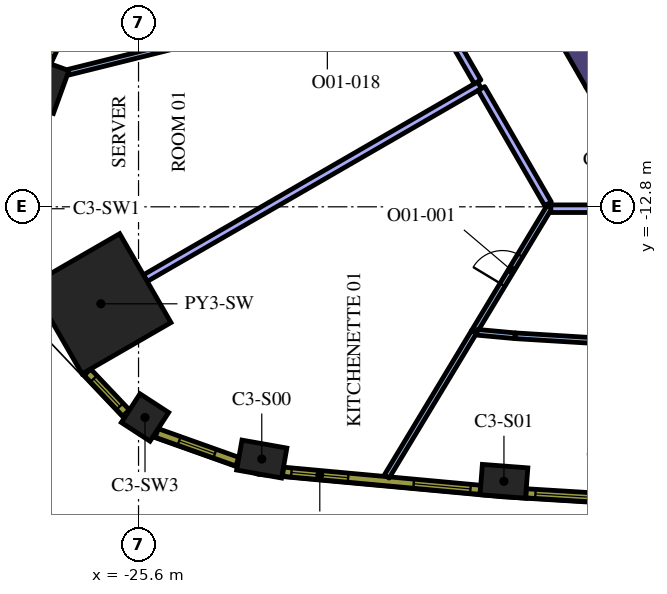
"""IFC4 building model, lengths in metres.
Left out: names, types, materials, properties, quantities, classifications, styles, units other than length and angle.
Written with IfcOpenShell. Run it as: python <this file> out.ifc"""

import sys

from ifc_helpers import new_model, si_unit, direction, frame, frame_2d, origin, origin_2d, place, context, subcontext, project, spatial, polyline, rectangle, outline, extrude, element, fill, save


model = new_model("IFC4")
c1 = context("Model", 3, precision=1e-05, world=origin(), true_north=direction((0.0, 1.0)))
c2 = subcontext(c1, "Body", "Model", "MODEL_VIEW")
j1 = project(units=[si_unit("LENGTHUNIT", "METRE"), si_unit("PLANEANGLEUNIT", "RADIAN")], contexts=[c1])
p1 = place(None, origin())
s1 = spatial("IfcSite", under=j1, at=p1, CompositionType="ELEMENT")
p2 = place(p1, origin())
s2 = spatial("IfcBuilding", under=s1, at=p2, CompositionType="ELEMENT")
p3 = place(p2, frame((0.0, 0.0, 141.6)))
s3 = spatial("IfcBuildingStorey", under=s2, at=p3, CompositionType="ELEMENT", Elevation=141.6)
p4 = place(p3, frame((-26.591, -15.352, 0.0), z_axis=(0.0, 0.0, 1.0), x_axis=(-0.866025403784, -0.5, 0.0)))
e1 = element("IfcColumn", 1, at=p4, inside=s3, PredefinedType="COLUMN", context=c2, shape_type="SweptSolid", body=[
    extrude(rectangle(XDim=2.7, YDim=2.7, at=origin_2d()), origin(), (0.0, 0.0, 1.0), 4.2),
])
for number, where, z_axis, x_axis in (
    (2, (-22.357, -19.437, 0.0), (0.0, 0.0, 1.0), (0.985, -0.175, 0.0)),
    (3, (-15.985, -20.022, 0.0), (0.0, 0.0, 1.0), (0.997, -0.076, 0.0)),
    (4, (-28.012, -9.644, 0.0), (0.0, 0.0, 1.0), (-0.341, -0.94, 0.0)),
):
    element("IfcColumn", number, at=place(p3, frame(where, z_axis=z_axis, x_axis=x_axis)), inside=s3, PredefinedType="COLUMN", context=c2, shape_type="SweptSolid", body=[
        extrude(rectangle(XDim=1.2, YDim=0.8, at=origin_2d()), origin(), (0.0, 0.0, 1.0), 4.2),
    ])
p5 = place(p3, frame((-25.43, -18.344, 0.0), z_axis=(0.0, 0.0, 1.0), x_axis=(0.838094050847, -0.545525766518, 0.0)))
e5 = element("IfcColumn", 5, at=p5, inside=s3, PredefinedType="COLUMN", context=c2, shape_type="SweptSolid", body=[
    extrude(rectangle(XDim=0.9, YDim=0.9, at=origin_2d()), origin(), (0.0, 0.0, 1.0), 4.2),
])
p6 = place(p3, origin())
e6 = element("IfcWall", 6, at=p6, inside=s3, PredefinedType="SOLIDWALL", context=c2, shape_type="SweptSolid", body=[
    extrude(outline(polyline([(-13.828, -9.65), (-13.38, -9.65), (-13.38, -10.426), (-13.828, -9.65)])), origin(), (0.0, 0.0, 1.0), 4.2),
])
p7 = place(p3, frame((-15.387, -6.148, 0.0), z_axis=(0.0, 0.0, 1.0), x_axis=(0.499984020225, -0.866034629516, 0.0)))
e7 = element("IfcWall", 7, at=p7, inside=s3, PredefinedType="SOLIDWALL", context=c2, shape_type="SweptSolid", body=[
    extrude(rectangle(XDim=3.824, YDim=0.8, at=frame_2d((1.912, 0.0))), origin(), (0.0, 0.0, 1.0), 4.2),
])
e8 = element("IfcWall", 8, at=p6, inside=s3, PredefinedType="SOLIDWALL", context=c2, shape_type="SweptSolid", body=[
    extrude(outline(polyline([(-12.904, -9.65), (-13.8, -9.65), (-13.128, -9.262), (-12.904, -9.65)])), origin(), (0.0, 0.0, 1.0), 4.2),
])
p8 = place(p3, frame((-12.84, -9.511, 0.0), z_axis=(0.0, 0.0, 1.0), x_axis=(-0.499997733992, 0.866026712061, 0.0)))
e9 = element("IfcWall", 9, at=p8, inside=s3, PredefinedType="SOLIDWALL", context=c2, shape_type="SweptSolid", body=[
    extrude(rectangle(XDim=3.634, YDim=0.25, at=frame_2d((1.817, 0.0))), origin(), (0.0, 0.0, 1.0), 4.2),
])
p9 = place(p3, frame((-16.771, -16.09, 0.0), z_axis=(0.0, 0.0, 1.0), x_axis=(-0.516817512045, -0.856095590015, 0.0)))
e10 = element("IfcWall", 10, at=p9, inside=s3, PredefinedType="PARTITIONING", context=c2, shape_type="SweptSolid", body=[
    extrude(rectangle(XDim=4.45, YDim=0.15, at=frame_2d((2.225, 0.0))), origin(), (0.0, 0.0, 1.0), 3.15),
])
p10 = place(p3, frame((-16.775, -16.097, 0.0), z_axis=(0.0, 0.0, 1.0), x_axis=(0.516793803756, 0.856109902057, 0.0)))
e11 = element("IfcWall", 11, at=p10, inside=s3, PredefinedType="PARTITIONING", context=c2, shape_type="SweptSolid", body=[
    extrude(rectangle(XDim=3.856, YDim=0.15, at=frame_2d((1.928, 0.0))), origin(), (0.0, 0.0, 1.0), 3.15),
])
p11 = place(p10, frame((1.456, 0.0, 0.0)))
e12 = element("IfcOpeningElement", 12, at=p11, cuts=e11, PredefinedType="OPENING", context=c2, shape_type="SweptSolid", body=[
    extrude(rectangle(XDim=0.9, YDim=2.1, at=frame_2d((0.45, 1.05))), frame((0.0, 0.085, 0.0), z_axis=(0.0, -1.0, 0.0), x_axis=(1.0, 0.0, 0.0)), (0.0, 0.0, 1.0), 0.17),
])
p12 = place(p3, frame((-25.421, -14.677, 0.0), z_axis=(0.0, 0.0, 1.0), x_axis=(0.866031435434, 0.499989552732, 0.0)))
e13 = element("IfcWall", 13, at=p12, inside=s3, PredefinedType="PARTITIONING", context=c2, shape_type="SweptSolid", body=[
    extrude(rectangle(XDim=10.154, YDim=0.2, at=frame_2d((5.077, 0.0))), origin(), (0.0, 0.0, 1.0), 3.15),
])
p13 = place(p3, frame((-16.578, -9.687, 0.0), z_axis=(0.0, 0.0, 1.0), x_axis=(0.499981686864, -0.86603597662, 0.0)))
e14 = element("IfcWall", 14, at=p13, inside=s3, PredefinedType="PARTITIONING", context=c2, shape_type="SweptSolid", body=[
    extrude(rectangle(XDim=3.506, YDim=0.2, at=frame_2d((1.753, 0.0))), origin(), (0.0, 0.0, 1.0), 3.15),
])
p14 = place(p3, frame((-16.69, -16.102, 0.0), z_axis=(0.0, 0.0, 1.0), x_axis=(0.995818997537, -0.091348366946, 0.0)))
e15 = element("IfcWall", 15, at=p14, inside=s3, PredefinedType="PARTITIONING", context=c2, shape_type="SweptSolid", body=[
    extrude(rectangle(XDim=1.002, YDim=0.15, at=frame_2d((0.501, 0.0))), origin(), (0.0, 0.0, 1.0), 3.15),
])
p15 = place(p3, frame((-9.421, -16.576, 0.0), z_axis=(0.0, 0.0, 1.0), x_axis=(-0.998137075468, 0.061011298754, 0.0)))
e16 = element("IfcWall", 16, at=p15, inside=s3, PredefinedType="PARTITIONING", context=c2, shape_type="SweptSolid", body=[
    extrude(rectangle(XDim=6.282, YDim=0.15, at=frame_2d((3.141, 0.0))), origin(), (0.0, 0.0, 1.0), 3.15),
])
p16 = place(p15, frame((2.683, 0.0, 0.0)))
e17 = element("IfcOpeningElement", 17, at=p16, cuts=e16, PredefinedType="OPENING", context=c2, shape_type="SweptSolid", body=[
    extrude(rectangle(XDim=0.9, YDim=2.1, at=frame_2d((0.45, 1.05))), frame((0.0, 0.085, 0.0), z_axis=(0.0, -1.0, 0.0), x_axis=(1.0, 0.0, 0.0)), (0.0, 0.0, 1.0), 0.17),
])
p17 = place(p3, frame((-14.751, -12.85, 0.0), z_axis=(0.0, 0.0, 1.0), x_axis=(1.0, 0.0, 0.0)))
e18 = element("IfcWall", 18, at=p17, inside=s3, PredefinedType="PARTITIONING", context=c2, shape_type="SweptSolid", body=[
    extrude(rectangle(XDim=9.721, YDim=0.2, at=frame_2d((4.861, 0.0))), origin(), (0.0, 0.0, 1.0), 3.15),
])
p18 = place(p3, frame((-23.203, -8.205, 0.0), z_axis=(0.0, 0.0, 1.0), x_axis=(-0.970525493326, -0.240998478843, 0.0)))
e19 = element("IfcWall", 19, at=p18, inside=s3, PredefinedType="PARTITIONING", context=c2, shape_type="SweptSolid", body=[
    extrude(rectangle(XDim=4.373, YDim=0.15, at=frame_2d((2.187, 0.0))), origin(), (0.0, 0.0, 1.0), 3.15),
])
p19 = place(p3, frame((-18.118, -7.02, 0.0), z_axis=(0.0, 0.0, 1.0), x_axis=(0.500023335103, -0.866011930837, 0.0)))
e20 = element("IfcWall", 20, at=p19, inside=s3, PredefinedType="PARTITIONING", context=c2, shape_type="SweptSolid", body=[
    extrude(rectangle(XDim=2.88, YDim=0.2, at=frame_2d((1.44, 0.0))), origin(), (0.0, 0.0, 1.0), 3.15),
])
p20 = place(p3, frame((-21.797, -19.77, 0.0), z_axis=(0.0, 0.0, 1.0), x_axis=(0.995808712151, -0.091460422067, 0.0)))
e21 = element("IfcWall", 21, at=p20, inside=s3, PredefinedType="SOLIDWALL", context=c2, shape_type="SweptSolid", body=[
    extrude(rectangle(XDim=5.213, YDim=0.24, at=frame_2d((2.606, 0.0))), origin(), (0.0, 0.0, 1.0), 3.95),
])
p21 = place(p20, frame((0.221, 0.0, 0.9)))
e22 = element("IfcOpeningElement", 22, at=p21, cuts=e21, PredefinedType="OPENING", context=c2, shape_type="SweptSolid", body=[
    extrude(rectangle(XDim=1.5, YDim=2.55, at=frame_2d((0.75, 1.275))), frame((0.0, 0.13, 0.0), z_axis=(0.0, -1.0, 0.0), x_axis=(1.0, 0.0, 0.0)), (0.0, 0.0, 1.0), 0.26),
])
p22 = place(p20, frame((3.452, 0.0, 0.9)))
e23 = element("IfcOpeningElement", 23, at=p22, cuts=e21, PredefinedType="OPENING", context=c2, shape_type="SweptSolid", body=[
    extrude(rectangle(XDim=1.5, YDim=2.55, at=frame_2d((0.75, 1.275))), frame((0.0, 0.13, 0.0), z_axis=(0.0, -1.0, 0.0), x_axis=(1.0, 0.0, 0.0)), (0.0, 0.0, 1.0), 0.26),
])
p23 = place(p3, frame((-15.405, -20.338, 0.0), z_axis=(0.0, 0.0, 1.0), x_axis=(0.998135294646, -0.061040425794, 0.0)))
e24 = element("IfcWall", 24, at=p23, inside=s3, PredefinedType="SOLIDWALL", context=c2, shape_type="SweptSolid", body=[
    extrude(rectangle(XDim=5.204, YDim=0.24, at=frame_2d((2.602, 0.0))), origin(), (0.0, 0.0, 1.0), 3.95),
])
p24 = place(p23, frame((0.248, 0.0, 0.9)))
e25 = element("IfcOpeningElement", 25, at=p24, cuts=e24, PredefinedType="OPENING", context=c2, shape_type="SweptSolid", body=[
    extrude(rectangle(XDim=1.5, YDim=2.55, at=frame_2d((0.75, 1.275))), frame((0.0, 0.13, 0.0), z_axis=(0.0, -1.0, 0.0), x_axis=(1.0, 0.0, 0.0)), (0.0, 0.0, 1.0), 0.26),
])
p25 = place(p23, frame((3.455, 0.0, 0.9)))
e26 = element("IfcOpeningElement", 26, at=p25, cuts=e24, PredefinedType="OPENING", context=c2, shape_type="SweptSolid", body=[
    extrude(rectangle(XDim=1.5, YDim=2.55, at=frame_2d((0.75, 1.275))), frame((0.0, 0.13, 0.0), z_axis=(0.0, -1.0, 0.0), x_axis=(1.0, 0.0, 0.0)), (0.0, 0.0, 1.0), 0.26),
])
p26 = place(p3, frame((-25.837, -4.258, 0.0), z_axis=(0.0, 0.0, 1.0), x_axis=(-0.418722559465, -0.908114209885, 0.0)))
e27 = element("IfcWall", 27, at=p26, inside=s3, PredefinedType="SOLIDWALL", context=c2, shape_type="SweptSolid", body=[
    extrude(rectangle(XDim=5.213, YDim=0.24, at=frame_2d((2.606, 0.0))), origin(), (0.0, 0.0, 1.0), 3.95),
])
p27 = place(p26, frame((0.261, 0.0, 0.9)))
e28 = element("IfcOpeningElement", 28, at=p27, cuts=e27, PredefinedType="OPENING", context=c2, shape_type="SweptSolid", body=[
    extrude(rectangle(XDim=1.5, YDim=2.55, at=frame_2d((0.75, 1.275))), frame((0.0, 0.13, 0.0), z_axis=(0.0, -1.0, 0.0), x_axis=(1.0, 0.0, 0.0)), (0.0, 0.0, 1.0), 0.26),
])
p28 = place(p26, frame((3.492, 0.0, 0.9)))
e29 = element("IfcOpeningElement", 29, at=p28, cuts=e27, PredefinedType="OPENING", context=c2, shape_type="SweptSolid", body=[
    extrude(rectangle(XDim=1.5, YDim=2.55, at=frame_2d((0.75, 1.275))), frame((0.0, 0.13, 0.0), z_axis=(0.0, -1.0, 0.0), x_axis=(1.0, 0.0, 0.0)), (0.0, 0.0, 1.0), 0.26),
])
p29 = place(p3, frame((-26.946, -17.151, 0.0), z_axis=(0.0, 0.0, 1.0), x_axis=(0.687986858937, -0.725723144133, 0.0)))
e30 = element("IfcWall", 30, at=p29, inside=s3, PredefinedType="SOLIDWALL", context=c2, shape_type="SweptSolid", body=[
    extrude(rectangle(XDim=1.481, YDim=0.24, at=frame_2d((0.741, 0.0))), origin(), (0.0, 0.0, 1.0), 3.95),
])
p30 = place(p29, frame((0.241, 0.0, 0.9)))
e31 = element("IfcOpeningElement", 31, at=p30, cuts=e30, PredefinedType="OPENING", context=c2, shape_type="SweptSolid", body=[
    extrude(rectangle(XDim=1.0, YDim=2.55, at=frame_2d((0.5, 1.275))), frame((0.0, 0.13, 0.0), z_axis=(0.0, -1.0, 0.0), x_axis=(1.0, 0.0, 0.0)), (0.0, 0.0, 1.0), 0.26),
])
p31 = place(p3, frame((-25.121, -18.751, 0.0), z_axis=(0.0, 0.0, 1.0), x_axis=(0.942099727267, -0.335332825539, 0.0)))
e32 = element("IfcWall", 32, at=p31, inside=s3, PredefinedType="SOLIDWALL", context=c2, shape_type="SweptSolid", body=[
    extrude(rectangle(XDim=2.25, YDim=0.24, at=frame_2d((1.125, 0.0))), origin(), (0.0, 0.0, 1.0), 3.95),
])
p32 = place(p31, frame((0.625, 0.0, 0.9)))
e33 = element("IfcOpeningElement", 33, at=p32, cuts=e32, PredefinedType="OPENING", context=c2, shape_type="SweptSolid", body=[
    extrude(rectangle(XDim=1.0, YDim=2.55, at=frame_2d((0.5, 1.275))), frame((0.0, 0.13, 0.0), z_axis=(0.0, -1.0, 0.0), x_axis=(1.0, 0.0, 0.0)), (0.0, 0.0, 1.0), 0.26),
])
p33 = place(p11, origin())
e34 = element("IfcDoor", 34, at=p33, inside=s3, OperationType="SINGLE_SWING_LEFT", PredefinedType="DOOR", context=c2, shape_type="SweptSolid", body=[
    extrude(rectangle(XDim=0.9, YDim=2.1, at=frame_2d((0.45, 1.05))), frame((0.0, 0.025, 0.0), z_axis=(0.0, -1.0, 0.0), x_axis=(1.0, 0.0, 0.0)), (0.0, 0.0, 1.0), 0.05),
])
fill(e12, e34)
p34 = place(p21, origin())
e35 = element("IfcWindow", 35, at=p34, inside=s3, PartitioningType="SINGLE_PANEL", PredefinedType="WINDOW", context=c2, shape_type="SweptSolid", body=[
    extrude(rectangle(XDim=1.5, YDim=2.55, at=frame_2d((0.75, 1.275))), frame((0.0, 0.04, 0.0), z_axis=(0.0, -1.0, 0.0), x_axis=(1.0, 0.0, 0.0)), (0.0, 0.0, 1.0), 0.06),
])
fill(e22, e35)
p35 = place(p22, origin())
e36 = element("IfcWindow", 36, at=p35, inside=s3, PartitioningType="SINGLE_PANEL", PredefinedType="WINDOW", context=c2, shape_type="SweptSolid", body=[
    extrude(rectangle(XDim=1.5, YDim=2.55, at=frame_2d((0.75, 1.275))), frame((0.0, 0.04, 0.0), z_axis=(0.0, -1.0, 0.0), x_axis=(1.0, 0.0, 0.0)), (0.0, 0.0, 1.0), 0.06),
])
fill(e23, e36)
p36 = place(p24, origin())
e37 = element("IfcWindow", 37, at=p36, inside=s3, PartitioningType="SINGLE_PANEL", PredefinedType="WINDOW", context=c2, shape_type="SweptSolid", body=[
    extrude(rectangle(XDim=1.5, YDim=2.55, at=frame_2d((0.75, 1.275))), frame((0.0, 0.04, 0.0), z_axis=(0.0, -1.0, 0.0), x_axis=(1.0, 0.0, 0.0)), (0.0, 0.0, 1.0), 0.06),
])
fill(e25, e37)
p37 = place(p28, origin())
e38 = element("IfcWindow", 38, at=p37, inside=s3, PartitioningType="SINGLE_PANEL", PredefinedType="WINDOW", context=c2, shape_type="SweptSolid", body=[
    extrude(rectangle(XDim=1.5, YDim=2.55, at=frame_2d((0.75, 1.275))), frame((0.0, 0.04, 0.0), z_axis=(0.0, -1.0, 0.0), x_axis=(1.0, 0.0, 0.0)), (0.0, 0.0, 1.0), 0.06),
])
fill(e29, e38)
p38 = place(p30, origin())
e39 = element("IfcWindow", 39, at=p38, inside=s3, PartitioningType="SINGLE_PANEL", PredefinedType="WINDOW", context=c2, shape_type="SweptSolid", body=[
    extrude(rectangle(XDim=1.0, YDim=2.55, at=frame_2d((0.5, 1.275))), frame((0.0, 0.04, 0.0), z_axis=(0.0, -1.0, 0.0), x_axis=(1.0, 0.0, 0.0)), (0.0, 0.0, 1.0), 0.06),
])
fill(e31, e39)
p39 = place(p32, origin())
e40 = element("IfcWindow", 40, at=p39, inside=s3, PartitioningType="SINGLE_PANEL", PredefinedType="WINDOW", context=c2, shape_type="SweptSolid", body=[
    extrude(rectangle(XDim=1.0, YDim=2.55, at=frame_2d((0.5, 1.275))), frame((0.0, 0.04, 0.0), z_axis=(0.0, -1.0, 0.0), x_axis=(1.0, 0.0, 0.0)), (0.0, 0.0, 1.0), 0.06),
])
fill(e33, e40)
save(model, sys.argv[1])
